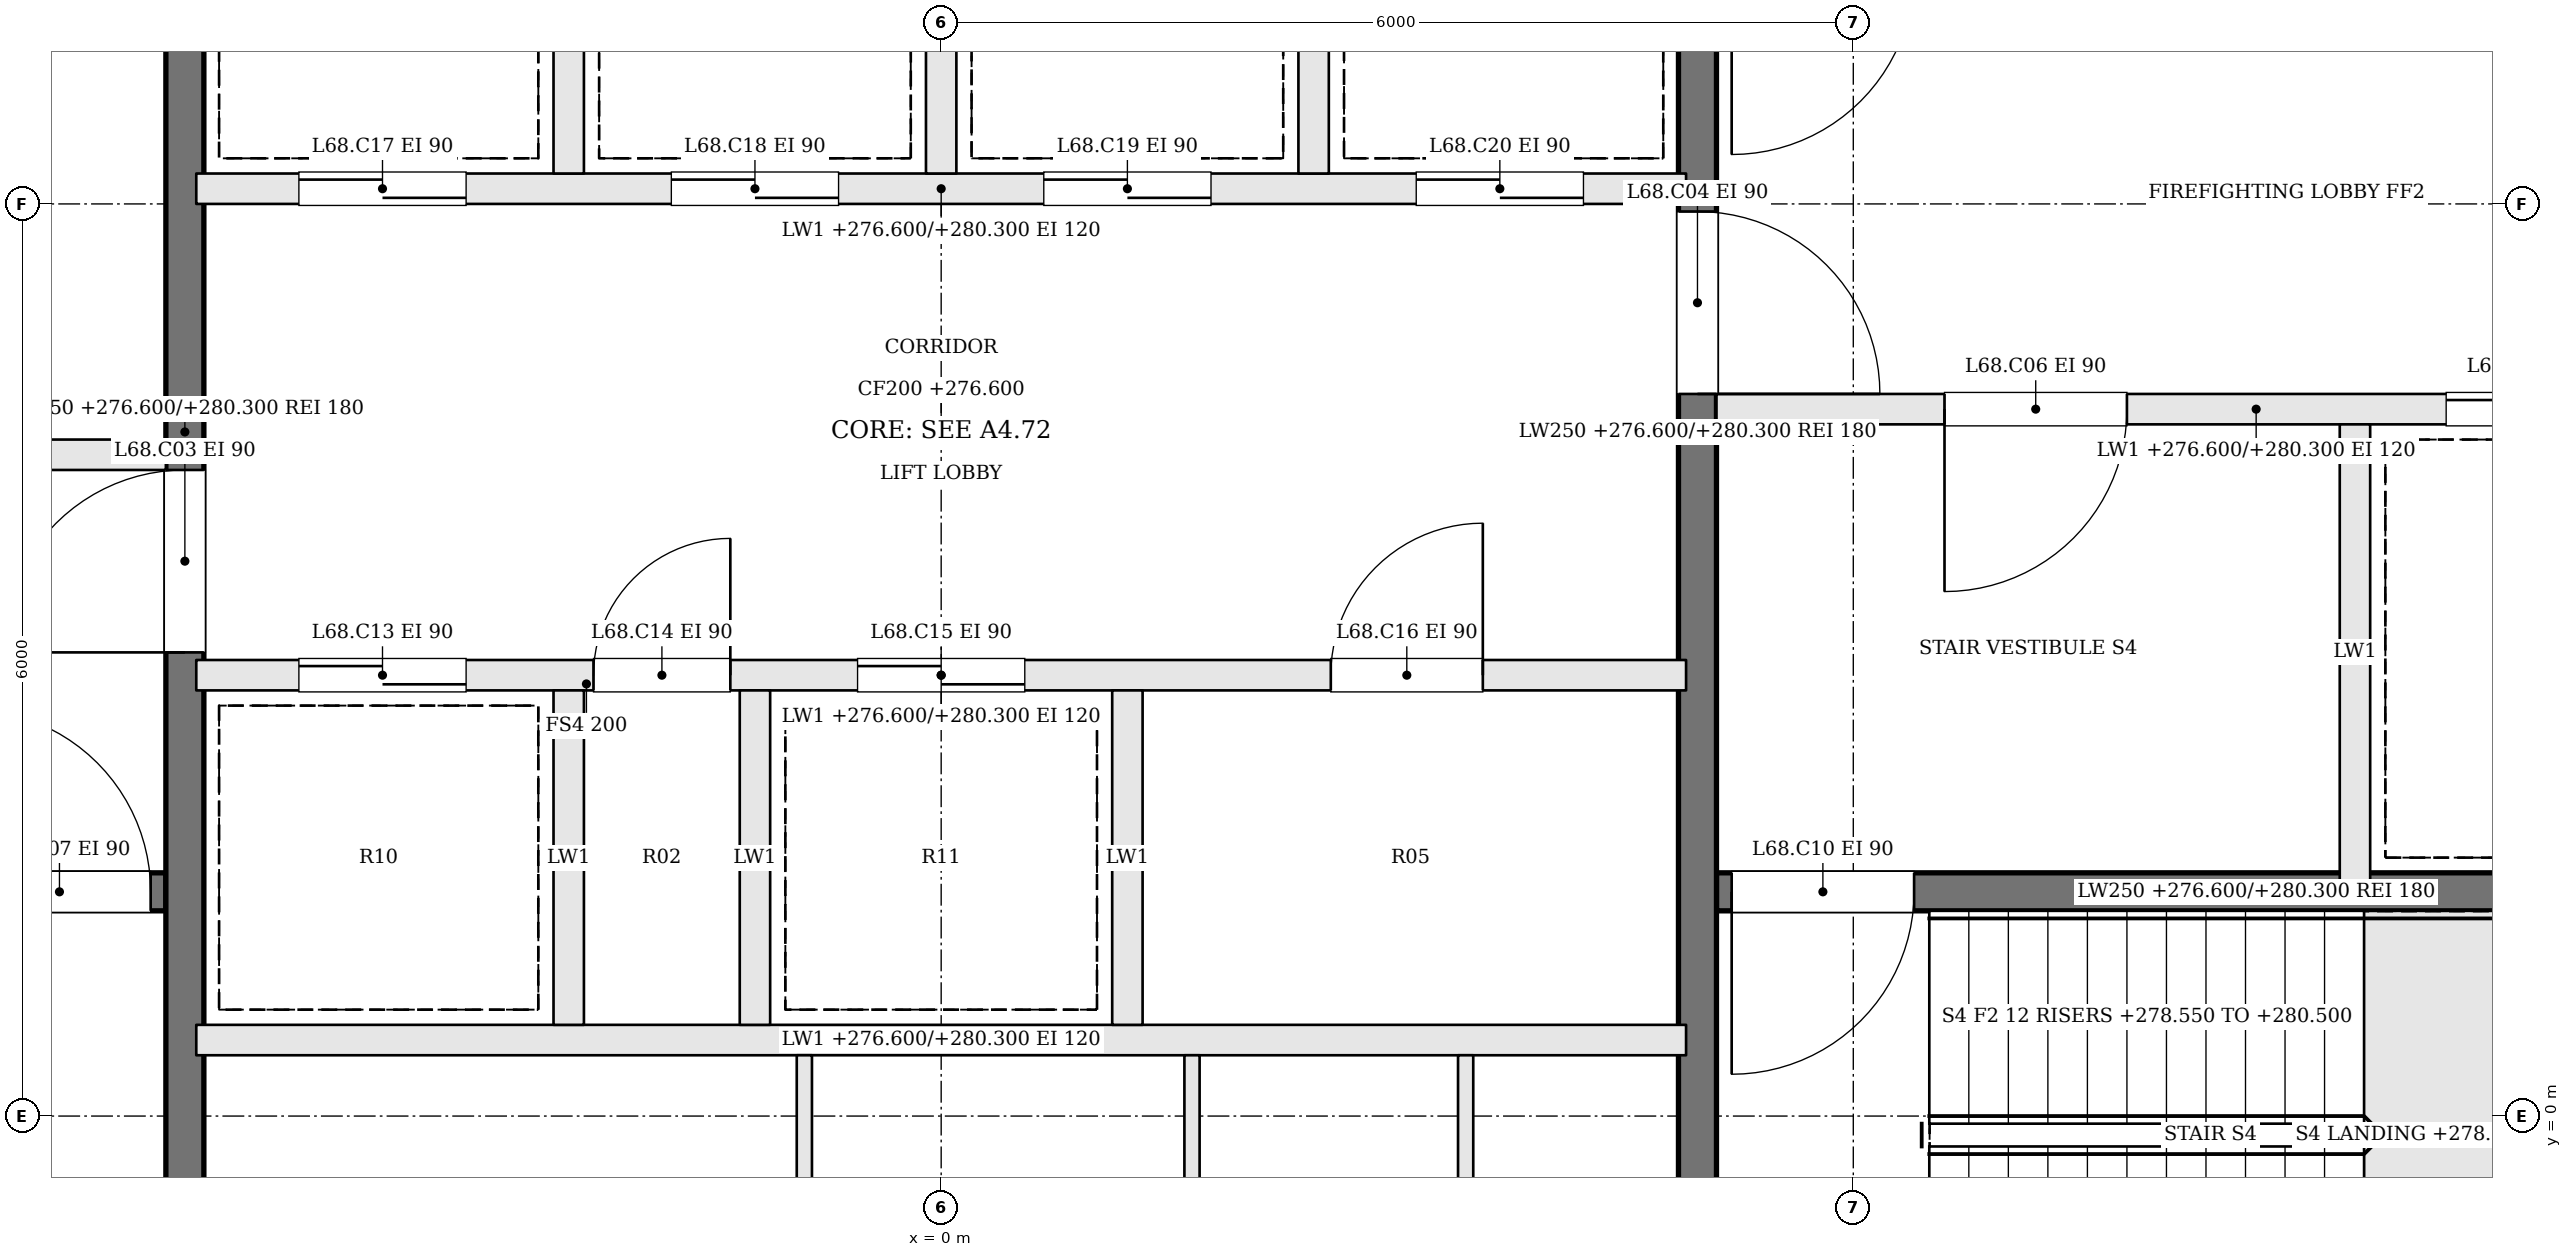
"""IFC4 building model, lengths in metres.
Left out: names, types, materials, properties, quantities, classifications, styles, units other than length and angle.
Written with IfcOpenShell. Run it as: python <this file> out.ifc"""

import sys

from ifc_helpers import new_model, si_unit, direction, frame, frame_2d, origin, place, context, subcontext, project, spatial, rectangle, extrude, element, fill, save


model = new_model("IFC4")
c1 = context("Model", 3, precision=1e-05, world=origin(), true_north=direction((0.0, 1.0)))
c2 = subcontext(c1, "Body", "Model", "MODEL_VIEW")
j1 = project(units=[si_unit("LENGTHUNIT", "METRE"), si_unit("PLANEANGLEUNIT", "RADIAN")], contexts=[c1])
p1 = place(None, origin())
s1 = spatial("IfcSite", under=j1, at=p1, CompositionType="ELEMENT")
p2 = place(p1, origin())
s2 = spatial("IfcBuilding", under=s1, at=p2, CompositionType="ELEMENT")
p3 = place(p2, frame((0.0, 0.0, 276.6)))
s3 = spatial("IfcBuildingStorey", under=s2, at=p3, CompositionType="ELEMENT", Elevation=276.6)
p4 = place(p3, frame((-12.2, 1.475, 0.0), z_axis=(0.0, 0.0, 1.0), x_axis=(1.0, 0.0, 0.0)))
e1 = element("IfcWall", 1, at=p4, inside=s3, PredefinedType="SOLIDWALL", context=c2, shape_type="SweptSolid", body=[
    extrude(rectangle(XDim=7.1, YDim=0.25, at=frame_2d((3.55, 0.0))), origin(), (0.0, 0.0, 1.0), 3.7),
])
p5 = place(p4, frame((5.8, 0.0, 0.0)))
e2 = element("IfcOpeningElement", 2, at=p5, cuts=e1, PredefinedType="OPENING", context=c2, shape_type="SweptSolid", body=[
    extrude(rectangle(XDim=1.2, YDim=2.1, at=frame_2d((0.6, 1.05))), frame((0.0, 0.135, 0.0), z_axis=(0.0, -1.0, 0.0), x_axis=(1.0, 0.0, 0.0)), (0.0, 0.0, 1.0), 0.27),
])
p6 = place(p3, frame((-12.2, 4.35, 0.0), z_axis=(0.0, 0.0, 1.0), x_axis=(1.0, 0.0, 0.0)))
e3 = element("IfcWall", 3, at=p6, inside=s3, PredefinedType="SOLIDWALL", context=c2, shape_type="SweptSolid", body=[
    extrude(rectangle(XDim=7.1, YDim=0.2, at=frame_2d((3.55, 0.0))), origin(), (0.0, 0.0, 1.0), 3.7),
])
p7 = place(p6, frame((4.4, 0.0, 0.0)))
e4 = element("IfcOpeningElement", 4, at=p7, cuts=e3, PredefinedType="OPENING", context=c2, shape_type="SweptSolid", body=[
    extrude(rectangle(XDim=1.2, YDim=2.1, at=frame_2d((0.6, 1.05))), frame((0.0, 0.11, 0.0), z_axis=(0.0, -1.0, 0.0), x_axis=(1.0, 0.0, 0.0)), (0.0, 0.0, 1.0), 0.22),
])
p8 = place(p6, frame((1.1, 0.0, 0.0)))
e5 = element("IfcOpeningElement", 5, at=p8, cuts=e3, PredefinedType="OPENING", context=c2, shape_type="SweptSolid", body=[
    extrude(rectangle(XDim=1.2, YDim=2.1, at=frame_2d((0.6, 1.05))), frame((0.0, 0.11, 0.0), z_axis=(0.0, -1.0, 0.0), x_axis=(1.0, 0.0, 0.0)), (0.0, 0.0, 1.0), 0.22),
])
p9 = place(p3, frame((12.2, 4.65, 0.0), z_axis=(0.0, 0.0, 1.0), x_axis=(-1.0, 0.0, 0.0)))
e6 = element("IfcWall", 6, at=p9, inside=s3, PredefinedType="SOLIDWALL", context=c2, shape_type="SweptSolid", body=[
    extrude(rectangle(XDim=7.1, YDim=0.2, at=frame_2d((3.55, 0.0))), origin(), (0.0, 0.0, 1.0), 3.7),
])
p10 = place(p9, frame((4.4, 0.0, 0.0)))
e7 = element("IfcOpeningElement", 7, at=p10, cuts=e6, PredefinedType="OPENING", context=c2, shape_type="SweptSolid", body=[
    extrude(rectangle(XDim=1.2, YDim=2.1, at=frame_2d((0.6, 1.05))), frame((0.0, 0.11, 0.0), z_axis=(0.0, -1.0, 0.0), x_axis=(1.0, 0.0, 0.0)), (0.0, 0.0, 1.0), 0.22),
])
p11 = place(p9, frame((1.1, 0.0, 0.0)))
e8 = element("IfcOpeningElement", 8, at=p11, cuts=e6, PredefinedType="OPENING", context=c2, shape_type="SweptSolid", body=[
    extrude(rectangle(XDim=1.2, YDim=2.1, at=frame_2d((0.6, 1.05))), frame((0.0, 0.11, 0.0), z_axis=(0.0, -1.0, 0.0), x_axis=(1.0, 0.0, 0.0)), (0.0, 0.0, 1.0), 0.22),
])
p12 = place(p3, frame((12.2, 1.475, 0.0), z_axis=(0.0, 0.0, 1.0), x_axis=(-1.0, 0.0, 0.0)))
e9 = element("IfcWall", 9, at=p12, inside=s3, PredefinedType="SOLIDWALL", context=c2, shape_type="SweptSolid", body=[
    extrude(rectangle(XDim=7.1, YDim=0.25, at=frame_2d((3.55, 0.0))), origin(), (0.0, 0.0, 1.0), 3.7),
])
p13 = place(p12, frame((5.8, 0.0, 0.0)))
e10 = element("IfcOpeningElement", 10, at=p13, cuts=e9, PredefinedType="OPENING", context=c2, shape_type="SweptSolid", body=[
    extrude(rectangle(XDim=1.2, YDim=2.1, at=frame_2d((0.6, 1.05))), frame((0.0, 0.135, 0.0), z_axis=(0.0, -1.0, 0.0), x_axis=(1.0, 0.0, 0.0)), (0.0, 0.0, 1.0), 0.27),
])
p14 = place(p3, frame((9.3, 4.55, 0.0), z_axis=(0.0, 0.0, 1.0), x_axis=(0.0, -1.0, 0.0)))
e11 = element("IfcWall", 11, at=p14, inside=s3, PredefinedType="SOLIDWALL", context=c2, shape_type="SweptSolid", body=[
    extrude(rectangle(XDim=3.0, YDim=0.2, at=frame_2d((1.5, 0.0))), origin(), (0.0, 0.0, 1.0), 3.7),
])
p15 = place(p3, frame((-4.975, -2.2, 0.0), z_axis=(0.0, 0.0, 1.0), x_axis=(0.0, 1.0, 0.0)))
e12 = element("IfcWall", 12, at=p15, inside=s3, PredefinedType="SOLIDWALL", context=c2, shape_type="SweptSolid", body=[
    extrude(rectangle(XDim=13.4, YDim=0.25, at=frame_2d((6.7, 0.0))), origin(), (0.0, 0.0, 1.0), 3.7),
])
p16 = place(p15, frame((5.25, 0.0, 0.0)))
e13 = element("IfcOpeningElement", 13, at=p16, cuts=e12, PredefinedType="OPENING", context=c2, shape_type="SweptSolid", body=[
    extrude(rectangle(XDim=1.2, YDim=2.1, at=frame_2d((0.6, 1.05))), frame((0.0, 0.135, 0.0), z_axis=(0.0, -1.0, 0.0), x_axis=(1.0, 0.0, 0.0)), (0.0, 0.0, 1.0), 0.27),
])
p17 = place(p3, frame((4.975, 11.2, 0.0), z_axis=(0.0, 0.0, 1.0), x_axis=(0.0, -1.0, 0.0)))
e14 = element("IfcWall", 14, at=p17, inside=s3, PredefinedType="SOLIDWALL", context=c2, shape_type="SweptSolid", body=[
    extrude(rectangle(XDim=13.4, YDim=0.25, at=frame_2d((6.7, 0.0))), origin(), (0.0, 0.0, 1.0), 3.7),
])
p18 = place(p17, frame((5.25, 0.0, 0.0)))
e15 = element("IfcOpeningElement", 15, at=p18, cuts=e14, PredefinedType="OPENING", context=c2, shape_type="SweptSolid", body=[
    extrude(rectangle(XDim=1.2, YDim=2.1, at=frame_2d((0.6, 1.05))), frame((0.0, 0.135, 0.0), z_axis=(0.0, -1.0, 0.0), x_axis=(1.0, 0.0, 0.0)), (0.0, 0.0, 1.0), 0.27),
])
p19 = place(p3, frame((-4.9, 0.5, 0.0), z_axis=(0.0, 0.0, 1.0), x_axis=(1.0, 0.0, 0.0)))
e16 = element("IfcWall", 16, at=p19, inside=s3, PredefinedType="SOLIDWALL", context=c2, shape_type="SweptSolid", body=[
    extrude(rectangle(XDim=9.8, YDim=0.2, at=frame_2d((4.9, 0.0))), origin(), (0.0, 0.0, 1.0), 3.7),
])
p20 = place(p3, frame((-4.9, 2.9, 0.0), z_axis=(0.0, 0.0, 1.0), x_axis=(1.0, 0.0, 0.0)))
e17 = element("IfcWall", 17, at=p20, inside=s3, PredefinedType="SOLIDWALL", context=c2, shape_type="SweptSolid", body=[
    extrude(rectangle(XDim=9.8, YDim=0.2, at=frame_2d((4.9, 0.0))), origin(), (0.0, 0.0, 1.0), 3.7),
])
p21 = place(p20, frame((0.675, 0.0, 0.0)))
e18 = element("IfcOpeningElement", 18, at=p21, cuts=e17, PredefinedType="OPENING", context=c2, shape_type="SweptSolid", body=[
    extrude(rectangle(XDim=1.1, YDim=2.1, at=frame_2d((0.55, 1.05))), frame((0.0, 0.11, 0.0), z_axis=(0.0, -1.0, 0.0), x_axis=(1.0, 0.0, 0.0)), (0.0, 0.0, 1.0), 0.22),
])
p22 = place(p20, frame((2.613, 0.0, 0.0)))
e19 = element("IfcOpeningElement", 19, at=p22, cuts=e17, PredefinedType="OPENING", context=c2, shape_type="SweptSolid", body=[
    extrude(rectangle(XDim=0.9, YDim=2.1, at=frame_2d((0.45, 1.05))), frame((0.0, 0.11, 0.0), z_axis=(0.0, -1.0, 0.0), x_axis=(1.0, 0.0, 0.0)), (0.0, 0.0, 1.0), 0.22),
])
p23 = place(p20, frame((4.35, 0.0, 0.0)))
e20 = element("IfcOpeningElement", 20, at=p23, cuts=e17, PredefinedType="OPENING", context=c2, shape_type="SweptSolid", body=[
    extrude(rectangle(XDim=1.1, YDim=2.1, at=frame_2d((0.55, 1.05))), frame((0.0, 0.11, 0.0), z_axis=(0.0, -1.0, 0.0), x_axis=(1.0, 0.0, 0.0)), (0.0, 0.0, 1.0), 0.22),
])
p24 = place(p20, frame((7.463, 0.0, 0.0)))
e21 = element("IfcOpeningElement", 21, at=p24, cuts=e17, PredefinedType="OPENING", context=c2, shape_type="SweptSolid", body=[
    extrude(rectangle(XDim=1.0, YDim=2.1, at=frame_2d((0.5, 1.05))), frame((0.0, 0.11, 0.0), z_axis=(0.0, -1.0, 0.0), x_axis=(1.0, 0.0, 0.0)), (0.0, 0.0, 1.0), 0.22),
])
p25 = place(p3, frame((-4.9, 6.1, 0.0), z_axis=(0.0, 0.0, 1.0), x_axis=(1.0, 0.0, 0.0)))
e22 = element("IfcWall", 22, at=p25, inside=s3, PredefinedType="SOLIDWALL", context=c2, shape_type="SweptSolid", body=[
    extrude(rectangle(XDim=9.8, YDim=0.2, at=frame_2d((4.9, 0.0))), origin(), (0.0, 0.0, 1.0), 3.7),
])
p26 = place(p25, frame((0.675, 0.0, 0.0)))
e23 = element("IfcOpeningElement", 23, at=p26, cuts=e22, PredefinedType="OPENING", context=c2, shape_type="SweptSolid", body=[
    extrude(rectangle(XDim=1.1, YDim=2.1, at=frame_2d((0.55, 1.05))), frame((0.0, 0.11, 0.0), z_axis=(0.0, -1.0, 0.0), x_axis=(1.0, 0.0, 0.0)), (0.0, 0.0, 1.0), 0.22),
])
p27 = place(p25, frame((3.125, 0.0, 0.0)))
e24 = element("IfcOpeningElement", 24, at=p27, cuts=e22, PredefinedType="OPENING", context=c2, shape_type="SweptSolid", body=[
    extrude(rectangle(XDim=1.1, YDim=2.1, at=frame_2d((0.55, 1.05))), frame((0.0, 0.11, 0.0), z_axis=(0.0, -1.0, 0.0), x_axis=(1.0, 0.0, 0.0)), (0.0, 0.0, 1.0), 0.22),
])
p28 = place(p25, frame((5.575, 0.0, 0.0)))
e25 = element("IfcOpeningElement", 25, at=p28, cuts=e22, PredefinedType="OPENING", context=c2, shape_type="SweptSolid", body=[
    extrude(rectangle(XDim=1.1, YDim=2.1, at=frame_2d((0.55, 1.05))), frame((0.0, 0.11, 0.0), z_axis=(0.0, -1.0, 0.0), x_axis=(1.0, 0.0, 0.0)), (0.0, 0.0, 1.0), 0.22),
])
p29 = place(p25, frame((8.025, 0.0, 0.0)))
e26 = element("IfcOpeningElement", 26, at=p29, cuts=e22, PredefinedType="OPENING", context=c2, shape_type="SweptSolid", body=[
    extrude(rectangle(XDim=1.1, YDim=2.1, at=frame_2d((0.55, 1.05))), frame((0.0, 0.11, 0.0), z_axis=(0.0, -1.0, 0.0), x_axis=(1.0, 0.0, 0.0)), (0.0, 0.0, 1.0), 0.22),
])
for number, where, z_axis, x_axis in (
    (27, (-2.45, 0.6, 0.0), (0.0, 0.0, 1.0), (0.0, 1.0, 0.0)),
    (28, (-1.225, 0.6, 0.0), (0.0, 0.0, 1.0), (0.0, 1.0, 0.0)),
    (29, (1.225, 0.6, 0.0), (0.0, 0.0, 1.0), (0.0, 1.0, 0.0)),
    (30, (-2.45, 6.2, 0.0), (0.0, 0.0, 1.0), (0.0, 1.0, 0.0)),
    (31, (0.0, 6.2, 0.0), (0.0, 0.0, 1.0), (0.0, 1.0, 0.0)),
    (32, (2.45, 6.2, 0.0), (0.0, 0.0, 1.0), (0.0, 1.0, 0.0)),
):
    element("IfcWall", number, at=place(p3, frame(where, z_axis=z_axis, x_axis=x_axis)), inside=s3, PredefinedType="SOLIDWALL", context=c2, shape_type="SweptSolid", body=[
        extrude(rectangle(XDim=2.2, YDim=0.2, at=frame_2d((1.1, 0.0))), origin(), (0.0, 0.0, 1.0), 3.7),
    ])
for number, where, z_axis, x_axis in (
    (33, (-0.9, -2.2, 0.0), (0.0, 0.0, 1.0), (0.0, 1.0, 0.0)),
    (34, (1.65, -2.2, 0.0), (0.0, 0.0, 1.0), (0.0, 1.0, 0.0)),
    (35, (3.45, -2.2, 0.0), (0.0, 0.0, 1.0), (0.0, 1.0, 0.0)),
):
    element("IfcWall", number, at=place(p3, frame(where, z_axis=z_axis, x_axis=x_axis)), inside=s3, PredefinedType="PARTITIONING", context=c2, shape_type="SweptSolid", body=[
        extrude(rectangle(XDim=2.6, YDim=0.1, at=frame_2d((1.3, 0.0))), origin(), (0.0, 0.0, 1.0), 3.7),
    ])
p30 = place(p16, origin())
e36 = element("IfcDoor", 36, at=p30, inside=s3, OperationType="SINGLE_SWING_LEFT", PredefinedType="DOOR", context=c2, shape_type="SweptSolid", body=[
    extrude(rectangle(XDim=1.2, YDim=2.1, at=frame_2d((0.6, 1.05))), frame((0.0, 0.025, 0.0), z_axis=(0.0, -1.0, 0.0), x_axis=(1.0, 0.0, 0.0)), (0.0, 0.0, 1.0), 0.05),
])
fill(e13, e36)
p31 = place(p18, origin())
e37 = element("IfcDoor", 37, at=p31, inside=s3, OperationType="SINGLE_SWING_RIGHT", PredefinedType="DOOR", context=c2, shape_type="SweptSolid", body=[
    extrude(rectangle(XDim=1.2, YDim=2.1, at=frame_2d((0.6, 1.05))), frame((0.0, 0.025, 0.0), z_axis=(0.0, -1.0, 0.0), x_axis=(1.0, 0.0, 0.0)), (0.0, 0.0, 1.0), 0.05),
])
fill(e15, e37)
p32 = place(p10, origin())
e38 = element("IfcDoor", 38, at=p32, inside=s3, OperationType="SINGLE_SWING_RIGHT", PredefinedType="DOOR", context=c2, shape_type="SweptSolid", body=[
    extrude(rectangle(XDim=1.2, YDim=2.1, at=frame_2d((0.6, 1.05))), frame((0.0, 0.025, 0.0), z_axis=(0.0, -1.0, 0.0), x_axis=(1.0, 0.0, 0.0)), (0.0, 0.0, 1.0), 0.05),
])
fill(e7, e38)
p33 = place(p5, origin())
e39 = element("IfcDoor", 39, at=p33, inside=s3, OperationType="SINGLE_SWING_LEFT", PredefinedType="DOOR", context=c2, shape_type="SweptSolid", body=[
    extrude(rectangle(XDim=1.2, YDim=2.1, at=frame_2d((0.6, 1.05))), frame((0.0, 0.025, 0.0), z_axis=(0.0, -1.0, 0.0), x_axis=(1.0, 0.0, 0.0)), (0.0, 0.0, 1.0), 0.05),
])
fill(e2, e39)
p34 = place(p13, origin())
e40 = element("IfcDoor", 40, at=p34, inside=s3, OperationType="SINGLE_SWING_RIGHT", PredefinedType="DOOR", context=c2, shape_type="SweptSolid", body=[
    extrude(rectangle(XDim=1.2, YDim=2.1, at=frame_2d((0.6, 1.05))), frame((0.0, 0.025, 0.0), z_axis=(0.0, -1.0, 0.0), x_axis=(1.0, 0.0, 0.0)), (0.0, 0.0, 1.0), 0.05),
])
fill(e10, e40)
p35 = place(p11, origin())
e41 = element("IfcDoor", 41, at=p35, inside=s3, OperationType="SLIDING_TO_RIGHT", PredefinedType="DOOR", context=c2, shape_type="SweptSolid", body=[
    extrude(rectangle(XDim=1.2, YDim=2.1, at=frame_2d((0.6, 1.05))), frame((0.0, 0.025, 0.0), z_axis=(0.0, -1.0, 0.0), x_axis=(1.0, 0.0, 0.0)), (0.0, 0.0, 1.0), 0.05),
])
fill(e8, e41)
p36 = place(p21, origin())
e42 = element("IfcDoor", 42, at=p36, inside=s3, OperationType="SLIDING_TO_RIGHT", PredefinedType="DOOR", context=c2, shape_type="SweptSolid", body=[
    extrude(rectangle(XDim=1.1, YDim=2.1, at=frame_2d((0.55, 1.05))), frame((0.0, 0.025, 0.0), z_axis=(0.0, -1.0, 0.0), x_axis=(1.0, 0.0, 0.0)), (0.0, 0.0, 1.0), 0.05),
])
fill(e18, e42)
p37 = place(p22, origin())
e43 = element("IfcDoor", 43, at=p37, inside=s3, OperationType="SINGLE_SWING_RIGHT", PredefinedType="DOOR", context=c2, shape_type="SweptSolid", body=[
    extrude(rectangle(XDim=0.9, YDim=2.1, at=frame_2d((0.45, 1.05))), frame((0.0, 0.025, 0.0), z_axis=(0.0, -1.0, 0.0), x_axis=(1.0, 0.0, 0.0)), (0.0, 0.0, 1.0), 0.05),
])
fill(e19, e43)
p38 = place(p23, origin())
e44 = element("IfcDoor", 44, at=p38, inside=s3, OperationType="SLIDING_TO_LEFT", PredefinedType="DOOR", context=c2, shape_type="SweptSolid", body=[
    extrude(rectangle(XDim=1.1, YDim=2.1, at=frame_2d((0.55, 1.05))), frame((0.0, 0.025, 0.0), z_axis=(0.0, -1.0, 0.0), x_axis=(1.0, 0.0, 0.0)), (0.0, 0.0, 1.0), 0.05),
])
fill(e20, e44)
p39 = place(p24, origin())
e45 = element("IfcDoor", 45, at=p39, inside=s3, OperationType="SINGLE_SWING_RIGHT", PredefinedType="DOOR", context=c2, shape_type="SweptSolid", body=[
    extrude(rectangle(XDim=1.0, YDim=2.1, at=frame_2d((0.5, 1.05))), frame((0.0, 0.025, 0.0), z_axis=(0.0, -1.0, 0.0), x_axis=(1.0, 0.0, 0.0)), (0.0, 0.0, 1.0), 0.05),
])
fill(e21, e45)
p40 = place(p26, origin())
e46 = element("IfcDoor", 46, at=p40, inside=s3, OperationType="SLIDING_TO_RIGHT", PredefinedType="DOOR", context=c2, shape_type="SweptSolid", body=[
    extrude(rectangle(XDim=1.1, YDim=2.1, at=frame_2d((0.55, 1.05))), frame((0.0, 0.025, 0.0), z_axis=(0.0, -1.0, 0.0), x_axis=(1.0, 0.0, 0.0)), (0.0, 0.0, 1.0), 0.05),
])
fill(e23, e46)
p41 = place(p27, origin())
e47 = element("IfcDoor", 47, at=p41, inside=s3, OperationType="SLIDING_TO_LEFT", PredefinedType="DOOR", context=c2, shape_type="SweptSolid", body=[
    extrude(rectangle(XDim=1.1, YDim=2.1, at=frame_2d((0.55, 1.05))), frame((0.0, 0.025, 0.0), z_axis=(0.0, -1.0, 0.0), x_axis=(1.0, 0.0, 0.0)), (0.0, 0.0, 1.0), 0.05),
])
fill(e24, e47)
p42 = place(p28, origin())
e48 = element("IfcDoor", 48, at=p42, inside=s3, OperationType="SLIDING_TO_RIGHT", PredefinedType="DOOR", context=c2, shape_type="SweptSolid", body=[
    extrude(rectangle(XDim=1.1, YDim=2.1, at=frame_2d((0.55, 1.05))), frame((0.0, 0.025, 0.0), z_axis=(0.0, -1.0, 0.0), x_axis=(1.0, 0.0, 0.0)), (0.0, 0.0, 1.0), 0.05),
])
fill(e25, e48)
p43 = place(p29, origin())
e49 = element("IfcDoor", 49, at=p43, inside=s3, OperationType="SLIDING_TO_LEFT", PredefinedType="DOOR", context=c2, shape_type="SweptSolid", body=[
    extrude(rectangle(XDim=1.1, YDim=2.1, at=frame_2d((0.55, 1.05))), frame((0.0, 0.025, 0.0), z_axis=(0.0, -1.0, 0.0), x_axis=(1.0, 0.0, 0.0)), (0.0, 0.0, 1.0), 0.05),
])
fill(e26, e49)
save(model, sys.argv[1])
